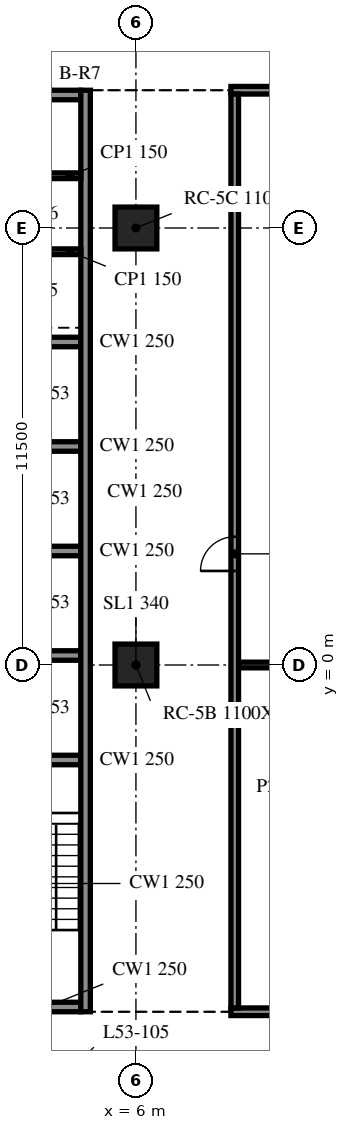
"""IFC4 building model, lengths in metres.
Left out: names, types, materials, properties, quantities, classifications, styles, units other than length and angle.
Written with IfcOpenShell. Run it as: python <this file> out.ifc"""

import sys

from ifc_helpers import new_model, si_unit, direction, frame, frame_2d, origin, origin_2d, place, context, subcontext, project, spatial, rectangle, extrude, element, fill, save


model = new_model("IFC4")
c1 = context("Model", 3, precision=1e-05, world=origin(), true_north=direction((0.0, 1.0)))
c2 = subcontext(c1, "Body", "Model", "MODEL_VIEW")
j1 = project(units=[si_unit("LENGTHUNIT", "METRE"), si_unit("PLANEANGLEUNIT", "RADIAN")], contexts=[c1])
p1 = place(None, origin())
s1 = spatial("IfcSite", under=j1, at=p1, CompositionType="ELEMENT")
p2 = place(p1, origin())
s2 = spatial("IfcBuilding", under=s1, at=p2, CompositionType="ELEMENT")
p3 = place(p2, frame((0.0, 0.0, 220.5)))
s3 = spatial("IfcBuildingStorey", under=s2, at=p3, CompositionType="ELEMENT", Elevation=220.5)
for number, where, z_axis, x_axis in (
    (1, (6.0, 0.0, -0.34), (0.0, 0.0, 1.0), (1.0, 0.0, 0.0)),
    (2, (6.0, 11.5, -0.34), (0.0, 0.0, 1.0), (1.0, 0.0, 0.0)),
):
    element("IfcColumn", number, at=place(p3, frame(where, z_axis=z_axis, x_axis=x_axis)), inside=s3, PredefinedType="COLUMN", context=c2, shape_type="SweptSolid", body=[
        extrude(rectangle(XDim=1.1, YDim=1.1, at=origin_2d()), origin(), (0.0, 0.0, 1.0), 3.74),
    ])
p4 = place(p3, frame((4.675, -9.125, 0.0), z_axis=(0.0, 0.0, 1.0), x_axis=(0.0, 1.0, 0.0)))
e3 = element("IfcWall", 3, at=p4, inside=s3, PredefinedType="SOLIDWALL", context=c2, shape_type="SweptSolid", body=[
    extrude(rectangle(XDim=24.25, YDim=0.25, at=frame_2d((12.125, 0.0))), origin(), (0.0, 0.0, 1.0), 3.4),
])
p5 = place(p3, frame((4.55, -9.0, 0.0), z_axis=(0.0, 0.0, 1.0), x_axis=(-1.0, 0.0, 0.0)))
e4 = element("IfcWall", 4, at=p5, inside=s3, PredefinedType="SOLIDWALL", context=c2, shape_type="SweptSolid", body=[
    extrude(rectangle(XDim=9.1, YDim=0.25, at=frame_2d((4.55, 0.0))), origin(), (0.0, 0.0, 1.0), 3.4),
])
p6 = place(p5, frame((3.65, 0.0, 0.0)))
e5 = element("IfcOpeningElement", 5, at=p6, cuts=e4, PredefinedType="OPENING", context=c2, shape_type="SweptSolid", body=[
    extrude(rectangle(XDim=1.8, YDim=2.1, at=frame_2d((0.9, 1.05))), frame((0.0, 0.135, 0.0), z_axis=(0.0, -1.0, 0.0), x_axis=(1.0, 0.0, 0.0)), (0.0, 0.0, 1.0), 0.27),
])
p7 = place(p3, frame((-4.55, 15.0, 0.0), z_axis=(0.0, 0.0, 1.0), x_axis=(1.0, 0.0, 0.0)))
e6 = element("IfcWall", 6, at=p7, inside=s3, PredefinedType="SOLIDWALL", context=c2, shape_type="SweptSolid", body=[
    extrude(rectangle(XDim=9.1, YDim=0.25, at=frame_2d((4.55, 0.0))), origin(), (0.0, 0.0, 1.0), 3.4),
])
p8 = place(p7, frame((3.65, 0.0, 0.0)))
e7 = element("IfcOpeningElement", 7, at=p8, cuts=e6, PredefinedType="OPENING", context=c2, shape_type="SweptSolid", body=[
    extrude(rectangle(XDim=1.8, YDim=2.1, at=frame_2d((0.9, 1.05))), frame((0.0, 0.135, 0.0), z_axis=(0.0, -1.0, 0.0), x_axis=(1.0, 0.0, 0.0)), (0.0, 0.0, 1.0), 0.27),
])
for number, where, z_axis, x_axis in (
    (8, (1.7, -2.5, 0.0), (0.0, 0.0, 1.0), (1.0, 0.0, 0.0)),
    (9, (1.7, 0.25, 0.0), (0.0, 0.0, 1.0), (1.0, 0.0, 0.0)),
    (10, (1.7, 3.0, 0.0), (0.0, 0.0, 1.0), (1.0, 0.0, 0.0)),
    (11, (1.7, 5.75, 0.0), (0.0, 0.0, 1.0), (1.0, 0.0, 0.0)),
    (12, (1.7, 8.5, 0.0), (0.0, 0.0, 1.0), (1.0, 0.0, 0.0)),
):
    element("IfcWall", number, at=place(p3, frame(where, z_axis=z_axis, x_axis=x_axis)), inside=s3, PredefinedType="SOLIDWALL", context=c2, shape_type="SweptSolid", body=[
        extrude(rectangle(XDim=2.85, YDim=0.25, at=frame_2d((1.425, 0.0))), origin(), (0.0, 0.0, 1.0), 3.4),
    ])
for number, where, z_axis, x_axis in (
    (13, (1.7, 10.875, 0.0), (0.0, 0.0, 1.0), (1.0, 0.0, 0.0)),
    (14, (1.7, 12.875, 0.0), (0.0, 0.0, 1.0), (1.0, 0.0, 0.0)),
):
    element("IfcWall", number, at=place(p3, frame(where, z_axis=z_axis, x_axis=x_axis)), inside=s3, PredefinedType="PARTITIONING", context=c2, shape_type="SweptSolid", body=[
        extrude(rectangle(XDim=2.85, YDim=0.15, at=frame_2d((1.425, 0.0))), origin(), (0.0, 0.0, 1.0), 3.4),
    ])
p9 = place(p3, frame((8.5, -9.125, 0.0), z_axis=(0.0, 0.0, 1.0), x_axis=(1.0, 0.0, 0.0)))
e15 = element("IfcWall", 15, at=p9, inside=s3, PredefinedType="PARTITIONING", context=c2, shape_type="SweptSolid", body=[
    extrude(rectangle(XDim=6.9, YDim=0.2, at=frame_2d((3.45, 0.0))), origin(), (0.0, 0.0, 1.0), 3.4),
])
p10 = place(p9, frame((2.9, 0.0, 0.0)))
e16 = element("IfcOpeningElement", 16, at=p10, cuts=e15, PredefinedType="OPENING", context=c2, shape_type="SweptSolid", body=[
    extrude(rectangle(XDim=0.9, YDim=2.1, at=frame_2d((0.45, 1.05))), frame((0.0, 0.11, 0.0), z_axis=(0.0, -1.0, 0.0), x_axis=(1.0, 0.0, 0.0)), (0.0, 0.0, 1.0), 0.22),
])
p11 = place(p3, frame((8.7, 0.0, 0.0), z_axis=(0.0, 0.0, 1.0), x_axis=(1.0, 0.0, 0.0)))
e17 = element("IfcWall", 17, at=p11, inside=s3, PredefinedType="PARTITIONING", context=c2, shape_type="SweptSolid", body=[
    extrude(rectangle(XDim=6.5, YDim=0.15, at=frame_2d((3.25, 0.0))), origin(), (0.0, 0.0, 1.0), 3.4),
])
p12 = place(p3, frame((8.5, 15.125, 0.0), z_axis=(0.0, 0.0, 1.0), x_axis=(1.0, 0.0, 0.0)))
e18 = element("IfcWall", 18, at=p12, inside=s3, PredefinedType="PARTITIONING", context=c2, shape_type="SweptSolid", body=[
    extrude(rectangle(XDim=6.9, YDim=0.2, at=frame_2d((3.45, 0.0))), origin(), (0.0, 0.0, 1.0), 3.4),
])
p13 = place(p3, frame((8.6, -9.025, 0.0), z_axis=(0.0, 0.0, 1.0), x_axis=(0.0, 1.0, 0.0)))
e19 = element("IfcWall", 19, at=p13, inside=s3, PredefinedType="PARTITIONING", context=c2, shape_type="SweptSolid", body=[
    extrude(rectangle(XDim=24.05, YDim=0.2, at=frame_2d((12.025, 0.0))), origin(), (0.0, 0.0, 1.0), 3.4),
])
p14 = place(p13, frame((11.5, 0.0, 0.0)))
e20 = element("IfcOpeningElement", 20, at=p14, cuts=e19, PredefinedType="OPENING", context=c2, shape_type="SweptSolid", body=[
    extrude(rectangle(XDim=0.9, YDim=2.1, at=frame_2d((0.45, 1.05))), frame((0.0, 0.11, 0.0), z_axis=(0.0, -1.0, 0.0), x_axis=(1.0, 0.0, 0.0)), (0.0, 0.0, 1.0), 0.22),
])
p15 = place(p14, origin())
e21 = element("IfcDoor", 21, at=p15, inside=s3, OperationType="SINGLE_SWING_RIGHT", PredefinedType="DOOR", context=c2, shape_type="SweptSolid", body=[
    extrude(rectangle(XDim=0.9, YDim=2.1, at=frame_2d((0.45, 1.05))), frame((0.0, 0.025, 0.0), z_axis=(0.0, -1.0, 0.0), x_axis=(1.0, 0.0, 0.0)), (0.0, 0.0, 1.0), 0.05),
])
fill(e20, e21)
save(model, sys.argv[1])
